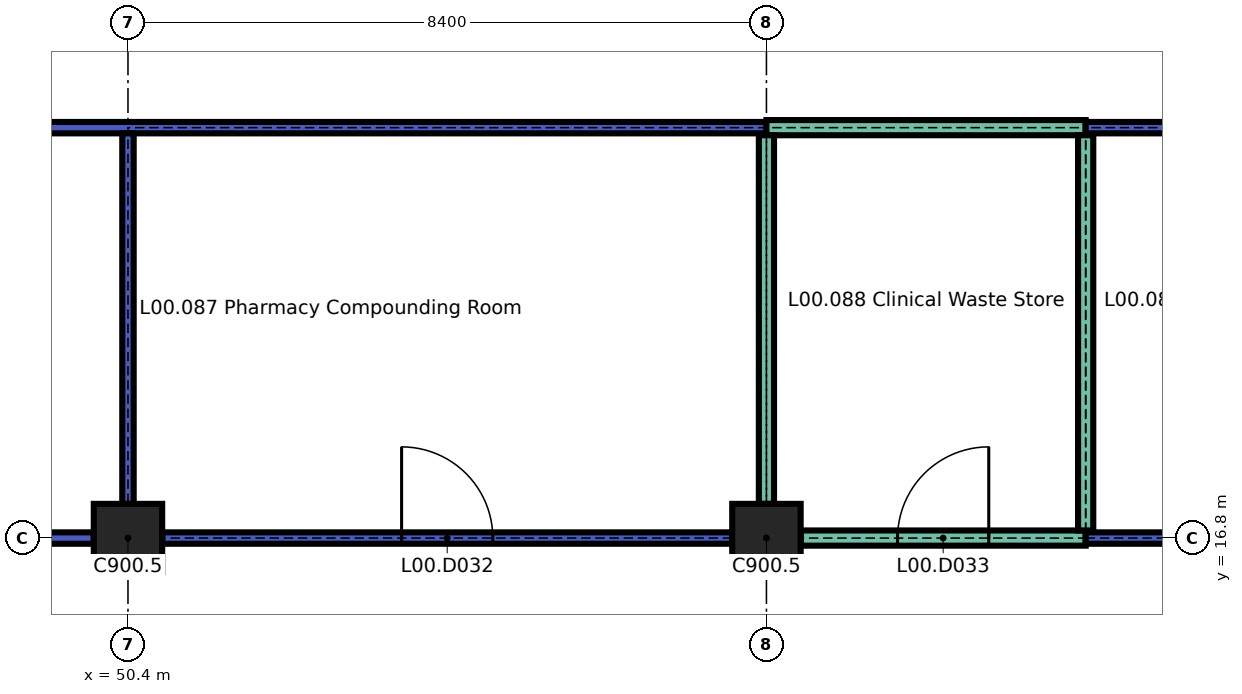
"""IFC4 building model, lengths in metres.
Left out: names, types, materials, properties, quantities, classifications, styles, units other than length and angle.
Written with IfcOpenShell. Run it as: python <this file> out.ifc"""

import sys

from ifc_helpers import new_model, si_unit, direction, frame, frame_2d, origin, origin_2d, place, context, subcontext, project, spatial, rectangle, extrude, element, fill, save


model = new_model("IFC4")
c1 = context("Model", 3, precision=1e-05, world=origin(), true_north=direction((0.0, 1.0)))
c2 = subcontext(c1, "Body", "Model", "MODEL_VIEW")
j1 = project(units=[si_unit("LENGTHUNIT", "METRE"), si_unit("PLANEANGLEUNIT", "RADIAN")], contexts=[c1])
p1 = place(None, origin())
s1 = spatial("IfcSite", under=j1, at=p1, CompositionType="ELEMENT")
p2 = place(p1, origin())
s2 = spatial("IfcBuilding", under=s1, at=p2, CompositionType="ELEMENT")
p3 = place(p2, origin())
s3 = spatial("IfcBuildingStorey", under=s2, at=p3, CompositionType="ELEMENT", Elevation=0.0)
for number, where, z_axis, x_axis in (
    (1, (50.4, 16.8, 0.0), (0.0, 0.0, 1.0), (1.0, 0.0, 0.0)),
    (2, (58.8, 16.8, 0.0), (0.0, 0.0, 1.0), (1.0, 0.0, 0.0)),
):
    element("IfcColumn", number, at=place(p3, frame(where, z_axis=z_axis, x_axis=x_axis)), inside=s3, PredefinedType="COLUMN", context=c2, shape_type="SweptSolid", body=[
        extrude(rectangle(XDim=0.9, YDim=0.9, at=origin_2d()), origin(), (0.0, 0.0, 1.0), 4.14),
    ])
p4 = place(p3, frame((42.45, 16.8, 0.0), z_axis=(0.0, 0.0, 1.0), x_axis=(1.0, 0.0, 0.0)))
e3 = element("IfcWall", 3, at=p4, inside=s3, PredefinedType="PARTITIONING", context=c2, shape_type="SweptSolid", body=[
    extrude(rectangle(XDim=7.5, YDim=0.15, at=frame_2d((3.75, 0.0))), origin(), (0.0, 0.0, 1.0), 4.14),
])
p5 = place(p3, frame((50.85, 16.8, 0.0), z_axis=(0.0, 0.0, 1.0), x_axis=(1.0, 0.0, 0.0)))
e4 = element("IfcWall", 4, at=p5, inside=s3, PredefinedType="PARTITIONING", context=c2, shape_type="SweptSolid", body=[
    extrude(rectangle(XDim=7.5, YDim=0.15, at=frame_2d((3.75, 0.0))), origin(), (0.0, 0.0, 1.0), 4.14),
])
p6 = place(p5, frame((3.15, 0.0, 0.0)))
e5 = element("IfcOpeningElement", 5, at=p6, cuts=e4, PredefinedType="OPENING", context=c2, shape_type="SweptSolid", body=[
    extrude(rectangle(XDim=1.2, YDim=2.1, at=frame_2d((0.6, 1.05))), frame((0.0, 0.085, 0.0), z_axis=(0.0, -1.0, 0.0), x_axis=(1.0, 0.0, 0.0)), (0.0, 0.0, 1.0), 0.17),
])
p7 = place(p3, frame((59.25, 16.8, 0.0), z_axis=(0.0, 0.0, 1.0), x_axis=(1.0, 0.0, 0.0)))
e6 = element("IfcWall", 6, at=p7, inside=s3, PredefinedType="PARTITIONING", context=c2, shape_type="SweptSolid", body=[
    extrude(rectangle(XDim=3.75, YDim=0.2, at=frame_2d((1.875, 0.0))), origin(), (0.0, 0.0, 1.0), 4.14),
])
p8 = place(p7, frame((1.275, 0.0, 0.0)))
e7 = element("IfcOpeningElement", 7, at=p8, cuts=e6, PredefinedType="OPENING", context=c2, shape_type="SweptSolid", body=[
    extrude(rectangle(XDim=1.2, YDim=2.1, at=frame_2d((0.6, 1.05))), frame((0.0, 0.11, 0.0), z_axis=(0.0, -1.0, 0.0), x_axis=(1.0, 0.0, 0.0)), (0.0, 0.0, 1.0), 0.22),
])
p9 = place(p3, frame((63.0, 16.8, 0.0), z_axis=(0.0, 0.0, 1.0), x_axis=(1.0, 0.0, 0.0)))
e8 = element("IfcWall", 8, at=p9, inside=s3, PredefinedType="PARTITIONING", context=c2, shape_type="SweptSolid", body=[
    extrude(rectangle(XDim=3.75, YDim=0.15, at=frame_2d((1.875, 0.0))), origin(), (0.0, 0.0, 1.0), 4.14),
])
p10 = place(p9, frame((1.275, 0.0, 0.0)))
e9 = element("IfcOpeningElement", 9, at=p10, cuts=e8, PredefinedType="OPENING", context=c2, shape_type="SweptSolid", body=[
    extrude(rectangle(XDim=1.2, YDim=2.1, at=frame_2d((0.6, 1.05))), frame((0.0, 0.085, 0.0), z_axis=(0.0, -1.0, 0.0), x_axis=(1.0, 0.0, 0.0)), (0.0, 0.0, 1.0), 0.17),
])
p11 = place(p3, frame((37.725, 22.2, 0.0), z_axis=(0.0, 0.0, 1.0), x_axis=(1.0, 0.0, 0.0)))
e10 = element("IfcWall", 10, at=p11, inside=s3, PredefinedType="PARTITIONING", context=c2, shape_type="SweptSolid", body=[
    extrude(rectangle(XDim=21.075, YDim=0.15, at=frame_2d((10.538, 0.0))), origin(), (0.0, 0.0, 1.0), 4.14),
])
p12 = place(p3, frame((58.8, 22.2, 0.0), z_axis=(0.0, 0.0, 1.0), x_axis=(1.0, 0.0, 0.0)))
e11 = element("IfcWall", 11, at=p12, inside=s3, PredefinedType="PARTITIONING", context=c2, shape_type="SweptSolid", body=[
    extrude(rectangle(XDim=4.2, YDim=0.2, at=frame_2d((2.1, 0.0))), origin(), (0.0, 0.0, 1.0), 4.14),
])
p13 = place(p3, frame((63.0, 22.2, 0.0), z_axis=(0.0, 0.0, 1.0), x_axis=(1.0, 0.0, 0.0)))
e12 = element("IfcWall", 12, at=p13, inside=s3, PredefinedType="PARTITIONING", context=c2, shape_type="SweptSolid", body=[
    extrude(rectangle(XDim=12.4, YDim=0.15, at=frame_2d((6.2, 0.0))), origin(), (0.0, 0.0, 1.0), 4.14),
])
p14 = place(p3, frame((50.4, 17.25, 0.0), z_axis=(0.0, 0.0, 1.0), x_axis=(0.0, 1.0, 0.0)))
e13 = element("IfcWall", 13, at=p14, inside=s3, PredefinedType="PARTITIONING", context=c2, shape_type="SweptSolid", body=[
    extrude(rectangle(XDim=4.875, YDim=0.15, at=frame_2d((2.438, 0.0))), origin(), (0.0, 0.0, 1.0), 4.14),
])
p15 = place(p3, frame((58.8, 17.25, 0.0), z_axis=(0.0, 0.0, 1.0), x_axis=(0.0, 1.0, 0.0)))
e14 = element("IfcWall", 14, at=p15, inside=s3, PredefinedType="PARTITIONING", context=c2, shape_type="SweptSolid", body=[
    extrude(rectangle(XDim=4.85, YDim=0.2, at=frame_2d((2.425, 0.0))), origin(), (0.0, 0.0, 1.0), 4.14),
])
p16 = place(p3, frame((63.0, 16.9, 0.0), z_axis=(0.0, 0.0, 1.0), x_axis=(0.0, 1.0, 0.0)))
e15 = element("IfcWall", 15, at=p16, inside=s3, PredefinedType="PARTITIONING", context=c2, shape_type="SweptSolid", body=[
    extrude(rectangle(XDim=5.2, YDim=0.2, at=frame_2d((2.6, 0.0))), origin(), (0.0, 0.0, 1.0), 4.14),
])
p17 = place(p6, origin())
e16 = element("IfcDoor", 16, at=p17, inside=s3, OperationType="SINGLE_SWING_RIGHT", PredefinedType="DOOR", context=c2, shape_type="SweptSolid", body=[
    extrude(rectangle(XDim=1.2, YDim=2.1, at=frame_2d((0.6, 1.05))), frame((0.0, 0.025, 0.0), z_axis=(0.0, -1.0, 0.0), x_axis=(1.0, 0.0, 0.0)), (0.0, 0.0, 1.0), 0.05),
])
fill(e5, e16)
p18 = place(p8, origin())
e17 = element("IfcDoor", 17, at=p18, inside=s3, OperationType="SINGLE_SWING_LEFT", PredefinedType="DOOR", context=c2, shape_type="SweptSolid", body=[
    extrude(rectangle(XDim=1.2, YDim=2.1, at=frame_2d((0.6, 1.05))), frame((0.0, 0.025, 0.0), z_axis=(0.0, -1.0, 0.0), x_axis=(1.0, 0.0, 0.0)), (0.0, 0.0, 1.0), 0.05),
])
fill(e7, e17)
save(model, sys.argv[1])
